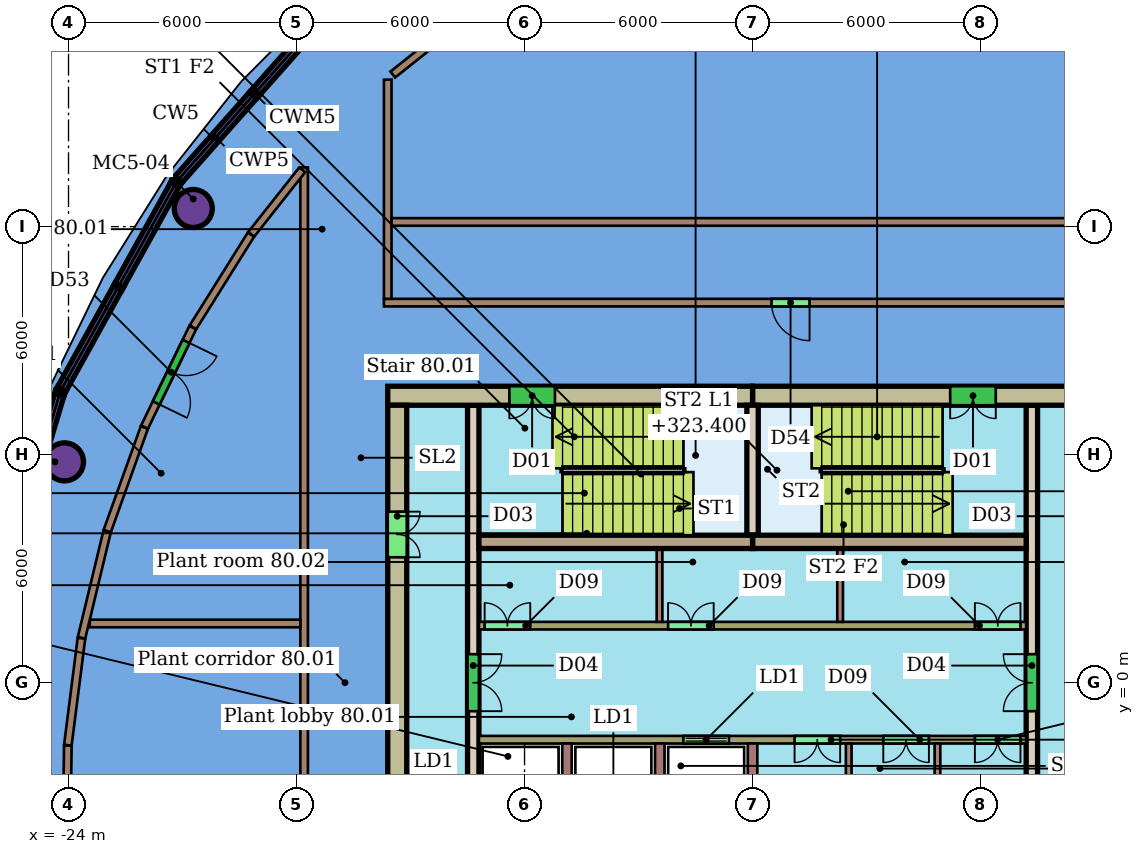
"""IFC4 building model, lengths in metres.
Left out: names, types, materials, properties, quantities, classifications, styles, units other than length and angle.
Written with IfcOpenShell. Run it as: python <this file> out.ifc"""

import sys

from ifc_helpers import new_model, si_unit, direction, frame, frame_2d, origin, origin_2d, place, context, subcontext, project, spatial, rectangle, hollow_circle, extrude, element, fill, save


model = new_model("IFC4")
c1 = context("Model", 3, precision=1e-05, world=origin(), true_north=direction((0.0, 1.0)))
c2 = subcontext(c1, "Body", "Model", "MODEL_VIEW")
j1 = project(units=[si_unit("LENGTHUNIT", "METRE"), si_unit("PLANEANGLEUNIT", "RADIAN")], contexts=[c1])
p1 = place(None, origin())
s1 = spatial("IfcSite", under=j1, at=p1, CompositionType="ELEMENT")
p2 = place(p1, origin())
s2 = spatial("IfcBuilding", under=s1, at=p2, CompositionType="ELEMENT")
p3 = place(p2, frame((0.0, 0.0, 321.3)))
s3 = spatial("IfcBuildingStorey", under=s2, at=p3, CompositionType="ELEMENT", Elevation=321.3)
for number, where, z_axis, x_axis in (
    (1, (-20.718, 12.477, 0.0), (0.0, 0.0, 1.0), (1.0, 0.0, 0.0)),
    (2, (-24.106, 5.81, 0.0), (0.0, 0.0, 1.0), (1.0, 0.0, 0.0)),
):
    element("IfcColumn", number, at=place(p3, frame(where, z_axis=z_axis, x_axis=x_axis)), inside=s3, PredefinedType="COLUMN", context=c2, shape_type="SweptSolid", body=[
        extrude(hollow_circle(Radius=0.5, WallThickness=0.04, at=origin_2d()), origin(), (0.0, 0.0, 1.0), 4.0),
    ])
p4 = place(p3, frame((5.7, 10.0, 0.0), z_axis=(0.0, 0.0, 1.0), x_axis=(-1.0, 0.0, 0.0)))
e3 = element("IfcWall", 3, at=p4, inside=s3, PredefinedType="PARTITIONING", context=c2, shape_type="SweptSolid", body=[
    extrude(rectangle(XDim=21.4, YDim=0.2, at=frame_2d((10.7, 0.0))), origin(), (0.0, 0.0, 1.0), 3.65),
])
p5 = place(p4, frame((10.2, 0.0, 0.0)))
e4 = element("IfcOpeningElement", 4, at=p5, cuts=e3, PredefinedType="OPENING", context=c2, shape_type="SweptSolid", body=[
    extrude(rectangle(XDim=1.0, YDim=2.1, at=frame_2d((0.5, 1.05))), frame((0.0, 0.11, 0.0), z_axis=(0.0, -1.0, 0.0), x_axis=(1.0, 0.0, 0.0)), (0.0, 0.0, 1.0), 0.22),
])
p6 = place(p3, frame((-17.8, -10.1, 0.0), z_axis=(0.0, 0.0, 1.0), x_axis=(0.0, 1.0, 0.0)))
e5 = element("IfcWall", 5, at=p6, inside=s3, PredefinedType="PARTITIONING", context=c2, shape_type="SweptSolid", body=[
    extrude(rectangle(XDim=23.658, YDim=0.2, at=frame_2d((11.829, 0.0))), origin(), (0.0, 0.0, 1.0), 3.65),
])
p7 = place(p3, frame((-15.6, 10.1, 0.0), z_axis=(0.0, 0.0, 1.0), x_axis=(0.0, 1.0, 0.0)))
e6 = element("IfcWall", 6, at=p7, inside=s3, PredefinedType="PARTITIONING", context=c2, shape_type="SweptSolid", body=[
    extrude(rectangle(XDim=5.767, YDim=0.2, at=frame_2d((2.884, 0.0))), origin(), (0.0, 0.0, 1.0), 3.65),
])
p8 = place(p3, frame((-15.5, 12.123, 0.0), z_axis=(0.0, 0.0, 1.0), x_axis=(1.0, 0.0, 0.0)))
e7 = element("IfcWall", 7, at=p8, inside=s3, PredefinedType="PARTITIONING", context=c2, shape_type="SweptSolid", body=[
    extrude(rectangle(XDim=25.617, YDim=0.2, at=frame_2d((12.808, 0.0))), origin(), (0.0, 0.0, 1.0), 3.65),
])
p9 = place(p3, frame((-15.468, 16.001, 0.0), z_axis=(0.0, 0.0, 1.0), x_axis=(0.782665833332, 0.62244212047, 0.0)))
e8 = element("IfcWall", 8, at=p9, inside=s3, PredefinedType="PARTITIONING", context=c2, shape_type="SweptSolid", body=[
    extrude(rectangle(XDim=2.712, YDim=0.2, at=frame_2d((1.356, 0.0))), origin(), (0.0, 0.0, 1.0), 3.65),
])
p10 = place(p3, frame((-23.44, 1.558, 0.0), z_axis=(0.0, 0.0, 1.0), x_axis=(1.0, 0.0, 0.0)))
e9 = element("IfcWall", 9, at=p10, inside=s3, PredefinedType="PARTITIONING", context=c2, shape_type="SweptSolid", body=[
    extrude(rectangle(XDim=5.54, YDim=0.2, at=frame_2d((2.77, 0.0))), origin(), (0.0, 0.0, 1.0), 3.65),
])
p11 = place(p3, frame((-22.982, 3.988, 0.0), z_axis=(0.0, 0.0, 1.0), x_axis=(0.337478197562, 0.941333344873, 0.0)))
e10 = element("IfcWall", 10, at=p11, inside=s3, PredefinedType="PARTITIONING", context=c2, shape_type="SweptSolid", body=[
    extrude(rectangle(XDim=2.898, YDim=0.2, at=frame_2d((1.449, 0.0))), origin(), (0.0, 0.0, 1.0), 3.65),
])
p12 = place(p3, frame((-20.73, 9.343, 0.0), z_axis=(0.0, 0.0, 1.0), x_axis=(-0.436405284506, -0.89975020292, 0.0)))
e11 = element("IfcWall", 11, at=p12, inside=s3, PredefinedType="PARTITIONING", context=c2, shape_type="SweptSolid", body=[
    extrude(rectangle(XDim=2.909, YDim=0.2, at=frame_2d((1.455, 0.0))), origin(), (0.0, 0.0, 1.0), 3.65),
])
p13 = place(p12, frame((0.403, 0.0, 0.0)))
e12 = element("IfcOpeningElement", 12, at=p13, cuts=e11, PredefinedType="OPENING", context=c2, shape_type="SweptSolid", body=[
    extrude(rectangle(XDim=1.8, YDim=2.4, at=frame_2d((0.9, 1.2))), frame((0.0, 0.11, 0.0), z_axis=(0.0, -1.0, 0.0), x_axis=(1.0, 0.0, 0.0)), (0.0, 0.0, 1.0), 0.22),
])
p14 = place(p3, frame((-20.725, 9.352, 0.0), z_axis=(0.0, 0.0, 1.0), x_axis=(0.530761457751, 0.847521253401, 0.0)))
e13 = element("IfcWall", 13, at=p14, inside=s3, PredefinedType="PARTITIONING", context=c2, shape_type="SweptSolid", body=[
    extrude(rectangle(XDim=2.877, YDim=0.2, at=frame_2d((1.438, 0.0))), origin(), (0.0, 0.0, 1.0), 3.65),
])
p15 = place(p3, frame((-19.191, 11.799, 0.0), z_axis=(0.0, 0.0, 1.0), x_axis=(0.620321195124, 0.784347891487, 0.0)))
e14 = element("IfcWall", 14, at=p15, inside=s3, PredefinedType="PARTITIONING", context=c2, shape_type="SweptSolid", body=[
    extrude(rectangle(XDim=2.163, YDim=0.2, at=frame_2d((1.081, 0.0))), origin(), (0.0, 0.0, 1.0), 3.65),
])
p16 = place(p3, frame((-23.658, 1.18, 0.0), z_axis=(0.0, 0.0, 1.0), x_axis=(0.234120678443, 0.972207543648, 0.0)))
e15 = element("IfcWall", 15, at=p16, inside=s3, PredefinedType="PARTITIONING", context=c2, shape_type="SweptSolid", body=[
    extrude(rectangle(XDim=2.877, YDim=0.2, at=frame_2d((1.438, 0.0))), origin(), (0.0, 0.0, 1.0), 3.65),
])
p17 = place(p3, frame((-24.056, -4.431, 0.0), z_axis=(0.0, 0.0, 1.0), x_axis=(0.013897320686, 0.999903427576, 0.0)))
e16 = element("IfcWall", 16, at=p17, inside=s3, PredefinedType="PARTITIONING", context=c2, shape_type="SweptSolid", body=[
    extrude(rectangle(XDim=2.776, YDim=0.2, at=frame_2d((1.388, 0.0))), origin(), (0.0, 0.0, 1.0), 3.65),
])
p18 = place(p3, frame((-24.018, -1.644, 0.0), z_axis=(0.0, 0.0, 1.0), x_axis=(0.126302032537, 0.991991832919, 0.0)))
e17 = element("IfcWall", 17, at=p18, inside=s3, PredefinedType="PARTITIONING", context=c2, shape_type="SweptSolid", body=[
    extrude(rectangle(XDim=2.836, YDim=0.2, at=frame_2d((1.418, 0.0))), origin(), (0.0, 0.0, 1.0), 3.65),
])
p19 = place(p3, frame((3.6, 7.55, 0.0), z_axis=(0.0, 0.0, 1.0), x_axis=(-1.0, 0.0, 0.0)))
e18 = element("IfcWall", 18, at=p19, inside=s3, PredefinedType="SHEAR", context=c2, shape_type="SweptSolid", body=[
    extrude(rectangle(XDim=9.6, YDim=0.5, at=frame_2d((4.8, 0.0))), origin(), (0.0, 0.0, 1.0), 3.9),
])
p20 = place(p19, frame((3.2, 0.0, 0.0)))
e19 = element("IfcOpeningElement", 19, at=p20, cuts=e18, PredefinedType="OPENING", context=c2, shape_type="SweptSolid", body=[
    extrude(rectangle(XDim=1.2, YDim=2.1, at=frame_2d((0.6, 1.05))), frame((0.0, 0.26, 0.0), z_axis=(0.0, -1.0, 0.0), x_axis=(1.0, 0.0, 0.0)), (0.0, 0.0, 1.0), 0.52),
])
p21 = place(p3, frame((-6.0, 7.55, 0.0), z_axis=(0.0, 0.0, 1.0), x_axis=(-1.0, 0.0, 0.0)))
e20 = element("IfcWall", 20, at=p21, inside=s3, PredefinedType="SHEAR", context=c2, shape_type="SweptSolid", body=[
    extrude(rectangle(XDim=9.6, YDim=0.5, at=frame_2d((4.8, 0.0))), origin(), (0.0, 0.0, 1.0), 3.9),
])
p22 = place(p21, frame((5.2, 0.0, 0.0)))
e21 = element("IfcOpeningElement", 21, at=p22, cuts=e20, PredefinedType="OPENING", context=c2, shape_type="SweptSolid", body=[
    extrude(rectangle(XDim=1.2, YDim=2.1, at=frame_2d((0.6, 1.05))), frame((0.0, 0.26, 0.0), z_axis=(0.0, -1.0, 0.0), x_axis=(1.0, 0.0, 0.0)), (0.0, 0.0, 1.0), 0.52),
])
p23 = place(p3, frame((-15.35, 7.3, 0.0), z_axis=(0.0, 0.0, 1.0), x_axis=(0.0, -1.0, 0.0)))
e22 = element("IfcWall", 22, at=p23, inside=s3, PredefinedType="SHEAR", context=c2, shape_type="SweptSolid", body=[
    extrude(rectangle(XDim=14.6, YDim=0.5, at=frame_2d((7.3, 0.0))), origin(), (0.0, 0.0, 1.0), 3.9),
])
p24 = place(p23, frame((10.6, 0.0, 0.0)))
e23 = element("IfcOpeningElement", 23, at=p24, cuts=e22, PredefinedType="OPENING", context=c2, shape_type="SweptSolid", body=[
    extrude(rectangle(XDim=1.2, YDim=2.1, at=frame_2d((0.6, 1.05))), frame((0.0, 0.26, 0.0), z_axis=(0.0, -1.0, 0.0), x_axis=(1.0, 0.0, 0.0)), (0.0, 0.0, 1.0), 0.52),
])
p25 = place(p23, frame((2.8, 0.0, 0.0)))
e24 = element("IfcOpeningElement", 24, at=p25, cuts=e22, PredefinedType="OPENING", context=c2, shape_type="SweptSolid", body=[
    extrude(rectangle(XDim=1.2, YDim=2.1, at=frame_2d((0.6, 1.05))), frame((0.0, 0.26, 0.0), z_axis=(0.0, -1.0, 0.0), x_axis=(1.0, 0.0, 0.0)), (0.0, 0.0, 1.0), 0.52),
])
for number, where, z_axis, x_axis in (
    (25, (-13.2, 3.705, 0.0), (0.0, 0.0, 1.0), (1.0, 0.0, 0.0)),
    (26, (-6.0, 3.705, 0.0), (0.0, 0.0, 1.0), (1.0, 0.0, 0.0)),
):
    element("IfcWall", number, at=place(p3, frame(where, z_axis=z_axis, x_axis=x_axis)), inside=s3, PredefinedType="SHEAR", context=c2, shape_type="SweptSolid", body=[
        extrude(rectangle(XDim=7.2, YDim=0.35, at=frame_2d((3.6, 0.0))), origin(), (0.0, 0.0, 1.0), 3.9),
    ])
p26 = place(p3, frame((-13.35, 7.3, 0.0), z_axis=(0.0, 0.0, 1.0), x_axis=(0.0, -1.0, 0.0)))
e27 = element("IfcWall", 27, at=p26, inside=s3, PredefinedType="SHEAR", context=c2, shape_type="SweptSolid", body=[
    extrude(rectangle(XDim=14.6, YDim=0.3, at=frame_2d((7.3, 0.0))), origin(), (0.0, 0.0, 1.0), 3.9),
])
p27 = place(p26, frame((6.55, 0.0, 0.0)))
e28 = element("IfcOpeningElement", 28, at=p27, cuts=e27, PredefinedType="OPENING", context=c2, shape_type="SweptSolid", body=[
    extrude(rectangle(XDim=1.5, YDim=2.1, at=frame_2d((0.75, 1.05))), frame((0.0, 0.16, 0.0), z_axis=(0.0, -1.0, 0.0), x_axis=(1.0, 0.0, 0.0)), (0.0, 0.0, 1.0), 0.32),
])
p28 = place(p3, frame((1.35, -7.3, 0.0), z_axis=(0.0, 0.0, 1.0), x_axis=(0.0, 1.0, 0.0)))
e29 = element("IfcWall", 29, at=p28, inside=s3, PredefinedType="SHEAR", context=c2, shape_type="SweptSolid", body=[
    extrude(rectangle(XDim=14.6, YDim=0.3, at=frame_2d((7.3, 0.0))), origin(), (0.0, 0.0, 1.0), 3.9),
])
p29 = place(p28, frame((1.21, 0.0, 0.0)))
e30 = element("IfcOpeningElement", 30, at=p29, cuts=e29, PredefinedType="OPENING", context=c2, shape_type="SweptSolid", body=[
    extrude(rectangle(XDim=1.0, YDim=2.1, at=frame_2d((0.5, 1.05))), frame((0.0, 0.16, 0.0), z_axis=(0.0, -1.0, 0.0), x_axis=(1.0, 0.0, 0.0)), (0.0, 0.0, 1.0), 0.32),
])
p30 = place(p28, frame((6.55, 0.0, 0.0)))
e31 = element("IfcOpeningElement", 31, at=p30, cuts=e29, PredefinedType="OPENING", context=c2, shape_type="SweptSolid", body=[
    extrude(rectangle(XDim=1.5, YDim=2.1, at=frame_2d((0.75, 1.05))), frame((0.0, 0.16, 0.0), z_axis=(0.0, -1.0, 0.0), x_axis=(1.0, 0.0, 0.0)), (0.0, 0.0, 1.0), 0.32),
])
p31 = place(p3, frame((-13.2, 1.5, 0.0), z_axis=(0.0, 0.0, 1.0), x_axis=(1.0, 0.0, 0.0)))
e32 = element("IfcWall", 32, at=p31, inside=s3, PredefinedType="SHEAR", context=c2, shape_type="SweptSolid", body=[
    extrude(rectangle(XDim=14.4, YDim=0.2, at=frame_2d((7.2, 0.0))), origin(), (0.0, 0.0, 1.0), 3.9),
])
p32 = place(p31, frame((0.15, 0.0, 0.0)))
e33 = element("IfcOpeningElement", 33, at=p32, cuts=e32, PredefinedType="OPENING", context=c2, shape_type="SweptSolid", body=[
    extrude(rectangle(XDim=1.2, YDim=2.4, at=frame_2d((0.6, 1.2))), frame((0.0, 0.11, 0.0), z_axis=(0.0, -1.0, 0.0), x_axis=(1.0, 0.0, 0.0)), (0.0, 0.0, 1.0), 0.22),
])
p33 = place(p31, frame((4.977, 0.0, 0.0)))
e34 = element("IfcOpeningElement", 34, at=p33, cuts=e32, PredefinedType="OPENING", context=c2, shape_type="SweptSolid", body=[
    extrude(rectangle(XDim=1.2, YDim=2.4, at=frame_2d((0.6, 1.2))), frame((0.0, 0.11, 0.0), z_axis=(0.0, -1.0, 0.0), x_axis=(1.0, 0.0, 0.0)), (0.0, 0.0, 1.0), 0.22),
])
p34 = place(p31, frame((13.05, 0.0, 0.0)))
e35 = element("IfcOpeningElement", 35, at=p34, cuts=e32, PredefinedType="OPENING", context=c2, shape_type="SweptSolid", body=[
    extrude(rectangle(XDim=1.2, YDim=2.4, at=frame_2d((0.6, 1.2))), frame((0.0, 0.11, 0.0), z_axis=(0.0, -1.0, 0.0), x_axis=(1.0, 0.0, 0.0)), (0.0, 0.0, 1.0), 0.22),
])
p35 = place(p3, frame((1.2, -1.5, 0.0), z_axis=(0.0, 0.0, 1.0), x_axis=(-1.0, 0.0, 0.0)))
e36 = element("IfcWall", 36, at=p35, inside=s3, PredefinedType="SHEAR", context=c2, shape_type="SweptSolid", body=[
    extrude(rectangle(XDim=14.4, YDim=0.2, at=frame_2d((7.2, 0.0))), origin(), (0.0, 0.0, 1.0), 3.9),
])
p36 = place(p35, frame((7.821, 0.0, 0.0)))
e37 = element("IfcOpeningElement", 37, at=p36, cuts=e36, PredefinedType="OPENING", context=c2, shape_type="SweptSolid", body=[
    extrude(rectangle(XDim=1.2, YDim=2.1, at=frame_2d((0.6, 1.05))), frame((0.0, 0.11, 0.0), z_axis=(0.0, -1.0, 0.0), x_axis=(1.0, 0.0, 0.0)), (0.0, 0.0, 1.0), 0.22),
])
p37 = place(p35, frame((4.895, 0.0, 0.0)))
e38 = element("IfcOpeningElement", 38, at=p37, cuts=e36, PredefinedType="OPENING", context=c2, shape_type="SweptSolid", body=[
    extrude(rectangle(XDim=1.2, YDim=2.4, at=frame_2d((0.6, 1.2))), frame((0.0, 0.11, 0.0), z_axis=(0.0, -1.0, 0.0), x_axis=(1.0, 0.0, 0.0)), (0.0, 0.0, 1.0), 0.22),
])
p38 = place(p35, frame((2.56, 0.0, 0.0)))
e39 = element("IfcOpeningElement", 39, at=p38, cuts=e36, PredefinedType="OPENING", context=c2, shape_type="SweptSolid", body=[
    extrude(rectangle(XDim=1.2, YDim=2.4, at=frame_2d((0.6, 1.2))), frame((0.0, 0.11, 0.0), z_axis=(0.0, -1.0, 0.0), x_axis=(1.0, 0.0, 0.0)), (0.0, 0.0, 1.0), 0.22),
])
p39 = place(p35, frame((0.15, 0.0, 0.0)))
e40 = element("IfcOpeningElement", 40, at=p39, cuts=e36, PredefinedType="OPENING", context=c2, shape_type="SweptSolid", body=[
    extrude(rectangle(XDim=1.2, YDim=2.4, at=frame_2d((0.6, 1.2))), frame((0.0, 0.11, 0.0), z_axis=(0.0, -1.0, 0.0), x_axis=(1.0, 0.0, 0.0)), (0.0, 0.0, 1.0), 0.22),
])
p40 = place(p3, frame((-6.0, 3.88, 0.0), z_axis=(0.0, 0.0, 1.0), x_axis=(0.0, 1.0, 0.0)))
e41 = element("IfcWall", 41, at=p40, inside=s3, PredefinedType="SHEAR", context=c2, shape_type="SweptSolid", body=[
    extrude(rectangle(XDim=3.42, YDim=0.3, at=frame_2d((1.71, 0.0))), origin(), (0.0, 0.0, 1.0), 3.9),
])
for number, where, z_axis, x_axis in (
    (42, (-8.448, 1.6, 0.0), (0.0, 0.0, 1.0), (0.0, 1.0, 0.0)),
    (43, (-3.696, 1.6, 0.0), (0.0, 0.0, 1.0), (0.0, 1.0, 0.0)),
):
    element("IfcWall", number, at=place(p3, frame(where, z_axis=z_axis, x_axis=x_axis)), inside=s3, PredefinedType="PARTITIONING", context=c2, shape_type="SweptSolid", body=[
        extrude(rectangle(XDim=1.93, YDim=0.15, at=frame_2d((0.965, 0.0))), origin(), (0.0, 0.0, 1.0), 3.9),
    ])
for number, where, z_axis, x_axis in (
    (44, (-10.883, -1.6, 0.0), (0.0, 0.0, 1.0), (0.0, -1.0, 0.0)),
    (45, (-8.442, -1.6, 0.0), (0.0, 0.0, 1.0), (0.0, -1.0, 0.0)),
    (46, (-6.0, -1.6, 0.0), (0.0, 0.0, 1.0), (0.0, -1.0, 0.0)),
):
    element("IfcWall", number, at=place(p3, frame(where, z_axis=z_axis, x_axis=x_axis)), inside=s3, PredefinedType="SHEAR", context=c2, shape_type="SweptSolid", body=[
        extrude(rectangle(XDim=1.93, YDim=0.25, at=frame_2d((0.965, 0.0))), origin(), (0.0, 0.0, 1.0), 3.9),
    ])
for number, where, z_axis, x_axis in (
    (47, (-3.469, -1.6, 0.0), (0.0, 0.0, 1.0), (0.0, -1.0, 0.0)),
    (48, (-1.135, -1.6, 0.0), (0.0, 0.0, 1.0), (0.0, -1.0, 0.0)),
):
    element("IfcWall", number, at=place(p3, frame(where, z_axis=z_axis, x_axis=x_axis)), inside=s3, PredefinedType="PARTITIONING", context=c2, shape_type="SweptSolid", body=[
        extrude(rectangle(XDim=1.93, YDim=0.15, at=frame_2d((0.965, 0.0))), origin(), (0.0, 0.0, 1.0), 3.9),
    ])
p41 = place(p5, origin())
e49 = element("IfcDoor", 49, at=p41, inside=s3, OperationType="SINGLE_SWING_LEFT", PredefinedType="DOOR", context=c2, shape_type="SweptSolid", body=[
    extrude(rectangle(XDim=1.0, YDim=2.1, at=frame_2d((0.5, 1.05))), frame((0.0, 0.025, 0.0), z_axis=(0.0, -1.0, 0.0), x_axis=(1.0, 0.0, 0.0)), (0.0, 0.0, 1.0), 0.05),
])
fill(e4, e49)
p42 = place(p13, origin())
e50 = element("IfcDoor", 50, at=p42, inside=s3, OperationType="DOUBLE_DOOR_SINGLE_SWING", PredefinedType="DOOR", context=c2, shape_type="SweptSolid", body=[
    extrude(rectangle(XDim=1.8, YDim=2.4, at=frame_2d((0.9, 1.2))), frame((0.0, 0.025, 0.0), z_axis=(0.0, -1.0, 0.0), x_axis=(1.0, 0.0, 0.0)), (0.0, 0.0, 1.0), 0.05),
])
fill(e12, e50)
p43 = place(p20, origin())
e51 = element("IfcDoor", 51, at=p43, inside=s3, OperationType="DOUBLE_DOOR_SINGLE_SWING", PredefinedType="NOTDEFINED", context=c2, shape_type="SweptSolid", body=[
    extrude(rectangle(XDim=1.2, YDim=2.1, at=frame_2d((0.6, 1.05))), frame((0.0, 0.025, 0.0), z_axis=(0.0, -1.0, 0.0), x_axis=(1.0, 0.0, 0.0)), (0.0, 0.0, 1.0), 0.05),
])
fill(e19, e51)
p44 = place(p22, origin())
e52 = element("IfcDoor", 52, at=p44, inside=s3, OperationType="DOUBLE_DOOR_SINGLE_SWING", PredefinedType="NOTDEFINED", context=c2, shape_type="SweptSolid", body=[
    extrude(rectangle(XDim=1.2, YDim=2.1, at=frame_2d((0.6, 1.05))), frame((0.0, 0.025, 0.0), z_axis=(0.0, -1.0, 0.0), x_axis=(1.0, 0.0, 0.0)), (0.0, 0.0, 1.0), 0.05),
])
fill(e21, e52)
p45 = place(p25, origin())
e53 = element("IfcDoor", 53, at=p45, inside=s3, OperationType="DOUBLE_DOOR_SINGLE_SWING", PredefinedType="NOTDEFINED", context=c2, shape_type="SweptSolid", body=[
    extrude(rectangle(XDim=1.2, YDim=2.1, at=frame_2d((0.6, 1.05))), frame((0.0, 0.025, 0.0), z_axis=(0.0, -1.0, 0.0), x_axis=(1.0, 0.0, 0.0)), (0.0, 0.0, 1.0), 0.05),
])
fill(e24, e53)
p46 = place(p27, origin())
e54 = element("IfcDoor", 54, at=p46, inside=s3, OperationType="DOUBLE_DOOR_SINGLE_SWING", PredefinedType="NOTDEFINED", context=c2, shape_type="SweptSolid", body=[
    extrude(rectangle(XDim=1.5, YDim=2.1, at=frame_2d((0.75, 1.05))), frame((0.0, 0.025, 0.0), z_axis=(0.0, -1.0, 0.0), x_axis=(1.0, 0.0, 0.0)), (0.0, 0.0, 1.0), 0.05),
])
fill(e28, e54)
p47 = place(p30, origin())
e55 = element("IfcDoor", 55, at=p47, inside=s3, OperationType="DOUBLE_DOOR_SINGLE_SWING", PredefinedType="NOTDEFINED", context=c2, shape_type="SweptSolid", body=[
    extrude(rectangle(XDim=1.5, YDim=2.1, at=frame_2d((0.75, 1.05))), frame((0.0, 0.025, 0.0), z_axis=(0.0, -1.0, 0.0), x_axis=(1.0, 0.0, 0.0)), (0.0, 0.0, 1.0), 0.05),
])
fill(e31, e55)
p48 = place(p32, origin())
e56 = element("IfcDoor", 56, at=p48, inside=s3, OperationType="DOUBLE_DOOR_SINGLE_SWING", PredefinedType="NOTDEFINED", context=c2, shape_type="SweptSolid", body=[
    extrude(rectangle(XDim=1.2, YDim=2.4, at=frame_2d((0.6, 1.2))), frame((0.0, 0.025, 0.0), z_axis=(0.0, -1.0, 0.0), x_axis=(1.0, 0.0, 0.0)), (0.0, 0.0, 1.0), 0.05),
])
fill(e33, e56)
p49 = place(p33, origin())
e57 = element("IfcDoor", 57, at=p49, inside=s3, OperationType="DOUBLE_DOOR_SINGLE_SWING", PredefinedType="NOTDEFINED", context=c2, shape_type="SweptSolid", body=[
    extrude(rectangle(XDim=1.2, YDim=2.4, at=frame_2d((0.6, 1.2))), frame((0.0, 0.025, 0.0), z_axis=(0.0, -1.0, 0.0), x_axis=(1.0, 0.0, 0.0)), (0.0, 0.0, 1.0), 0.05),
])
fill(e34, e57)
p50 = place(p34, origin())
e58 = element("IfcDoor", 58, at=p50, inside=s3, OperationType="DOUBLE_DOOR_SINGLE_SWING", PredefinedType="NOTDEFINED", context=c2, shape_type="SweptSolid", body=[
    extrude(rectangle(XDim=1.2, YDim=2.4, at=frame_2d((0.6, 1.2))), frame((0.0, 0.025, 0.0), z_axis=(0.0, -1.0, 0.0), x_axis=(1.0, 0.0, 0.0)), (0.0, 0.0, 1.0), 0.05),
])
fill(e35, e58)
p51 = place(p36, origin())
e59 = element("IfcDoor", 59, at=p51, inside=s3, OperationType="DOUBLE_DOOR_SLIDING", PredefinedType="NOTDEFINED", context=c2, shape_type="SweptSolid", body=[
    extrude(rectangle(XDim=1.2, YDim=2.1, at=frame_2d((0.6, 1.05))), frame((0.0, 0.025, 0.0), z_axis=(0.0, -1.0, 0.0), x_axis=(1.0, 0.0, 0.0)), (0.0, 0.0, 1.0), 0.05),
])
fill(e37, e59)
p52 = place(p37, origin())
e60 = element("IfcDoor", 60, at=p52, inside=s3, OperationType="DOUBLE_DOOR_SINGLE_SWING", PredefinedType="NOTDEFINED", context=c2, shape_type="SweptSolid", body=[
    extrude(rectangle(XDim=1.2, YDim=2.4, at=frame_2d((0.6, 1.2))), frame((0.0, 0.025, 0.0), z_axis=(0.0, -1.0, 0.0), x_axis=(1.0, 0.0, 0.0)), (0.0, 0.0, 1.0), 0.05),
])
fill(e38, e60)
p53 = place(p38, origin())
e61 = element("IfcDoor", 61, at=p53, inside=s3, OperationType="DOUBLE_DOOR_SINGLE_SWING", PredefinedType="NOTDEFINED", context=c2, shape_type="SweptSolid", body=[
    extrude(rectangle(XDim=1.2, YDim=2.4, at=frame_2d((0.6, 1.2))), frame((0.0, 0.025, 0.0), z_axis=(0.0, -1.0, 0.0), x_axis=(1.0, 0.0, 0.0)), (0.0, 0.0, 1.0), 0.05),
])
fill(e39, e61)
p54 = place(p39, origin())
e62 = element("IfcDoor", 62, at=p54, inside=s3, OperationType="DOUBLE_DOOR_SINGLE_SWING", PredefinedType="NOTDEFINED", context=c2, shape_type="SweptSolid", body=[
    extrude(rectangle(XDim=1.2, YDim=2.4, at=frame_2d((0.6, 1.2))), frame((0.0, 0.025, 0.0), z_axis=(0.0, -1.0, 0.0), x_axis=(1.0, 0.0, 0.0)), (0.0, 0.0, 1.0), 0.05),
])
fill(e40, e62)
save(model, sys.argv[1])
